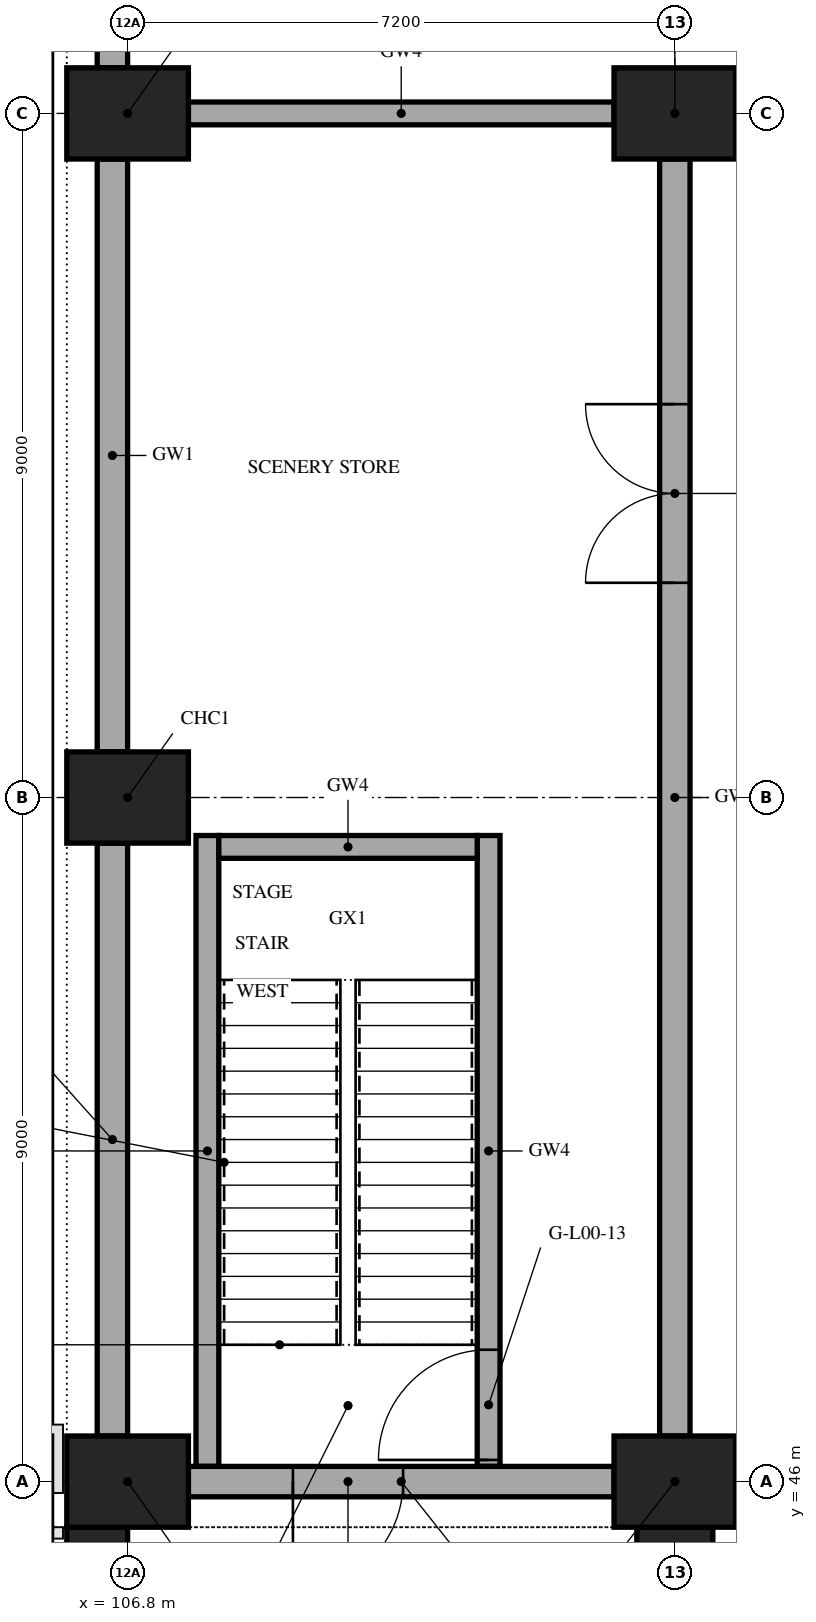
"""IFC4 building model, lengths in metres.
Left out: names, types, materials, properties, quantities, classifications, styles, units other than length and angle.
Written with IfcOpenShell. Run it as: python <this file> out.ifc"""

import sys

from ifc_helpers import new_model, si_unit, direction, frame, frame_2d, origin, origin_2d, place, context, subcontext, project, spatial, rectangle, extrude, element, fill, save


model = new_model("IFC4")
c1 = context("Model", 3, precision=1e-05, world=origin(), true_north=direction((0.0, 1.0)))
c2 = subcontext(c1, "Body", "Model", "MODEL_VIEW")
j1 = project(units=[si_unit("LENGTHUNIT", "METRE"), si_unit("PLANEANGLEUNIT", "RADIAN")], contexts=[c1])
p1 = place(None, origin())
s1 = spatial("IfcSite", under=j1, at=p1, CompositionType="ELEMENT")
p2 = place(p1, origin())
s2 = spatial("IfcBuilding", under=s1, at=p2, CompositionType="ELEMENT")
p3 = place(p2, origin())
s3 = spatial("IfcBuildingStorey", under=s2, at=p3, CompositionType="ELEMENT", Elevation=0.0)
p4 = place(p3, frame((106.4, 44.9, -0.3), z_axis=(0.0, 0.0, 1.0), x_axis=(1.0, 0.0, 0.0)))
e1 = element("IfcColumn", 1, at=p4, inside=s3, PredefinedType="COLUMN", context=c2, shape_type="SweptSolid", body=[
    extrude(rectangle(XDim=0.8, YDim=1.0, at=origin_2d()), origin(), (0.0, 0.0, 1.0), 5.3),
])
p5 = place(p3, frame((114.0, 44.9, -0.3), z_axis=(0.0, 0.0, 1.0), x_axis=(1.0, 0.0, 0.0)))
e2 = element("IfcColumn", 2, at=p5, inside=s3, PredefinedType="COLUMN", context=c2, shape_type="SweptSolid", body=[
    extrude(rectangle(XDim=1.0, YDim=1.0, at=origin_2d()), origin(), (0.0, 0.0, 1.0), 5.3),
])
for number, where, z_axis, x_axis in (
    (3, (106.8, 46.0, 0.0), (0.0, 0.0, 1.0), (1.0, 0.0, 0.0)),
    (4, (114.0, 46.0, 0.0), (0.0, 0.0, 1.0), (1.0, 0.0, 0.0)),
    (5, (106.8, 55.0, 0.0), (0.0, 0.0, 1.0), (1.0, 0.0, 0.0)),
    (6, (106.8, 64.0, 0.0), (0.0, 0.0, 1.0), (1.0, 0.0, 0.0)),
    (7, (114.0, 64.0, 0.0), (0.0, 0.0, 1.0), (1.0, 0.0, 0.0)),
):
    element("IfcColumn", number, at=place(p3, frame(where, z_axis=z_axis, x_axis=x_axis)), inside=s3, PredefinedType="COLUMN", context=c2, shape_type="SweptSolid", body=[
        extrude(rectangle(XDim=1.6, YDim=1.2, at=origin_2d()), origin(), (0.0, 0.0, 1.0), 5.0),
    ])
p6 = place(p3, frame((114.0, 46.6, 0.0), z_axis=(0.0, 0.0, 1.0), x_axis=(0.0, 1.0, 0.0)))
e8 = element("IfcWall", 8, at=p6, inside=s3, PredefinedType="SHEAR", context=c2, shape_type="SweptSolid", body=[
    extrude(rectangle(XDim=16.8, YDim=0.4, at=frame_2d((8.4, 0.0))), origin(), (0.0, 0.0, 1.0), 5.0),
])
p7 = place(p6, frame((11.225, 0.0, 0.0)))
e9 = element("IfcOpeningElement", 9, at=p7, cuts=e8, PredefinedType="OPENING", context=c2, shape_type="SweptSolid", body=[
    extrude(rectangle(XDim=2.35, YDim=2.4, at=frame_2d((1.175, 1.2))), frame((0.0, 0.21, 0.0), z_axis=(0.0, -1.0, 0.0), x_axis=(1.0, 0.0, 0.0)), (0.0, 0.0, 1.0), 0.42),
])
p8 = place(p3, frame((107.6, 64.0, 0.0), z_axis=(0.0, 0.0, 1.0), x_axis=(1.0, 0.0, 0.0)))
e10 = element("IfcWall", 10, at=p8, inside=s3, PredefinedType="SHEAR", context=c2, shape_type="SweptSolid", body=[
    extrude(rectangle(XDim=5.6, YDim=0.3, at=frame_2d((2.8, 0.0))), origin(), (0.0, 0.0, 1.0), 5.0),
])
p9 = place(p3, frame((107.85, 46.2, 0.0), z_axis=(0.0, 0.0, 1.0), x_axis=(0.0, 1.0, 0.0)))
e11 = element("IfcWall", 11, at=p9, inside=s3, PredefinedType="SHEAR", context=c2, shape_type="SweptSolid", body=[
    extrude(rectangle(XDim=8.3, YDim=0.3, at=frame_2d((4.15, 0.0))), origin(), (0.0, 0.0, 1.0), 5.0),
])
p10 = place(p3, frame((111.55, 46.2, 0.0), z_axis=(0.0, 0.0, 1.0), x_axis=(0.0, 1.0, 0.0)))
e12 = element("IfcWall", 12, at=p10, inside=s3, PredefinedType="SHEAR", context=c2, shape_type="SweptSolid", body=[
    extrude(rectangle(XDim=8.3, YDim=0.3, at=frame_2d((4.15, 0.0))), origin(), (0.0, 0.0, 1.0), 5.0),
])
p11 = place(p10, frame((0.085, 0.0, 0.0)))
e13 = element("IfcOpeningElement", 13, at=p11, cuts=e12, PredefinedType="OPENING", context=c2, shape_type="SweptSolid", body=[
    extrude(rectangle(XDim=1.45, YDim=2.1, at=frame_2d((0.725, 1.05))), frame((0.0, 0.16, 0.0), z_axis=(0.0, -1.0, 0.0), x_axis=(1.0, 0.0, 0.0)), (0.0, 0.0, 1.0), 0.32),
])
p12 = place(p3, frame((108.0, 54.35, 0.0), z_axis=(0.0, 0.0, 1.0), x_axis=(1.0, 0.0, 0.0)))
e14 = element("IfcWall", 14, at=p12, inside=s3, PredefinedType="SHEAR", context=c2, shape_type="SweptSolid", body=[
    extrude(rectangle(XDim=3.4, YDim=0.3, at=frame_2d((1.7, 0.0))), origin(), (0.0, 0.0, 1.0), 5.0),
])
for number, where, z_axis, x_axis in (
    (15, (106.6, 46.6, 0.0), (0.0, 0.0, 1.0), (0.0, 1.0, 0.0)),
    (16, (106.6, 55.6, 0.0), (0.0, 0.0, 1.0), (0.0, 1.0, 0.0)),
    (17, (106.6, 64.6, 0.0), (0.0, 0.0, 1.0), (0.0, 1.0, 0.0)),
):
    element("IfcWall", number, at=place(p3, frame(where, z_axis=z_axis, x_axis=x_axis)), inside=s3, PredefinedType="SOLIDWALL", context=c2, shape_type="SweptSolid", body=[
        extrude(rectangle(XDim=7.8, YDim=0.4, at=frame_2d((3.9, 0.0))), origin(), (0.0, 0.0, 1.0), 5.0),
    ])
p13 = place(p3, frame((107.6, 46.0, 0.0), z_axis=(0.0, 0.0, 1.0), x_axis=(1.0, 0.0, 0.0)))
e18 = element("IfcWall", 18, at=p13, inside=s3, PredefinedType="SOLIDWALL", context=c2, shape_type="SweptSolid", body=[
    extrude(rectangle(XDim=5.6, YDim=0.4, at=frame_2d((2.8, 0.0))), origin(), (0.0, 0.0, 1.0), 4.4),
])
p14 = place(p13, frame((1.375, 0.0, 0.0)))
e19 = element("IfcOpeningElement", 19, at=p14, cuts=e18, PredefinedType="OPENING", context=c2, shape_type="SweptSolid", body=[
    extrude(rectangle(XDim=1.45, YDim=2.1, at=frame_2d((0.725, 1.05))), frame((0.0, 0.21, 0.0), z_axis=(0.0, -1.0, 0.0), x_axis=(1.0, 0.0, 0.0)), (0.0, 0.0, 1.0), 0.42),
])
p15 = place(p14, frame((1.45, 0.0, 0.0), z_axis=(0.0, 0.0, 1.0), x_axis=(-1.0, 0.0, 0.0)))
e20 = element("IfcDoor", 20, at=p15, inside=s3, OperationType="SINGLE_SWING_RIGHT", PredefinedType="DOOR", context=c2, shape_type="SweptSolid", body=[
    extrude(rectangle(XDim=1.45, YDim=2.1, at=frame_2d((0.725, 1.05))), frame((0.0, 0.025, 0.0), z_axis=(0.0, -1.0, 0.0), x_axis=(1.0, 0.0, 0.0)), (0.0, 0.0, 1.0), 0.05),
])
fill(e19, e20)
p16 = place(p11, origin())
e21 = element("IfcDoor", 21, at=p16, inside=s3, OperationType="SINGLE_SWING_LEFT", PredefinedType="DOOR", context=c2, shape_type="SweptSolid", body=[
    extrude(rectangle(XDim=1.45, YDim=2.1, at=frame_2d((0.725, 1.05))), frame((0.0, 0.025, 0.0), z_axis=(0.0, -1.0, 0.0), x_axis=(1.0, 0.0, 0.0)), (0.0, 0.0, 1.0), 0.05),
])
fill(e13, e21)
p17 = place(p7, origin())
e22 = element("IfcDoor", 22, at=p17, inside=s3, OperationType="DOUBLE_DOOR_SINGLE_SWING", PredefinedType="DOOR", context=c2, shape_type="SweptSolid", body=[
    extrude(rectangle(XDim=2.35, YDim=2.4, at=frame_2d((1.175, 1.2))), frame((0.0, 0.025, 0.0), z_axis=(0.0, -1.0, 0.0), x_axis=(1.0, 0.0, 0.0)), (0.0, 0.0, 1.0), 0.05),
])
fill(e9, e22)
save(model, sys.argv[1])
